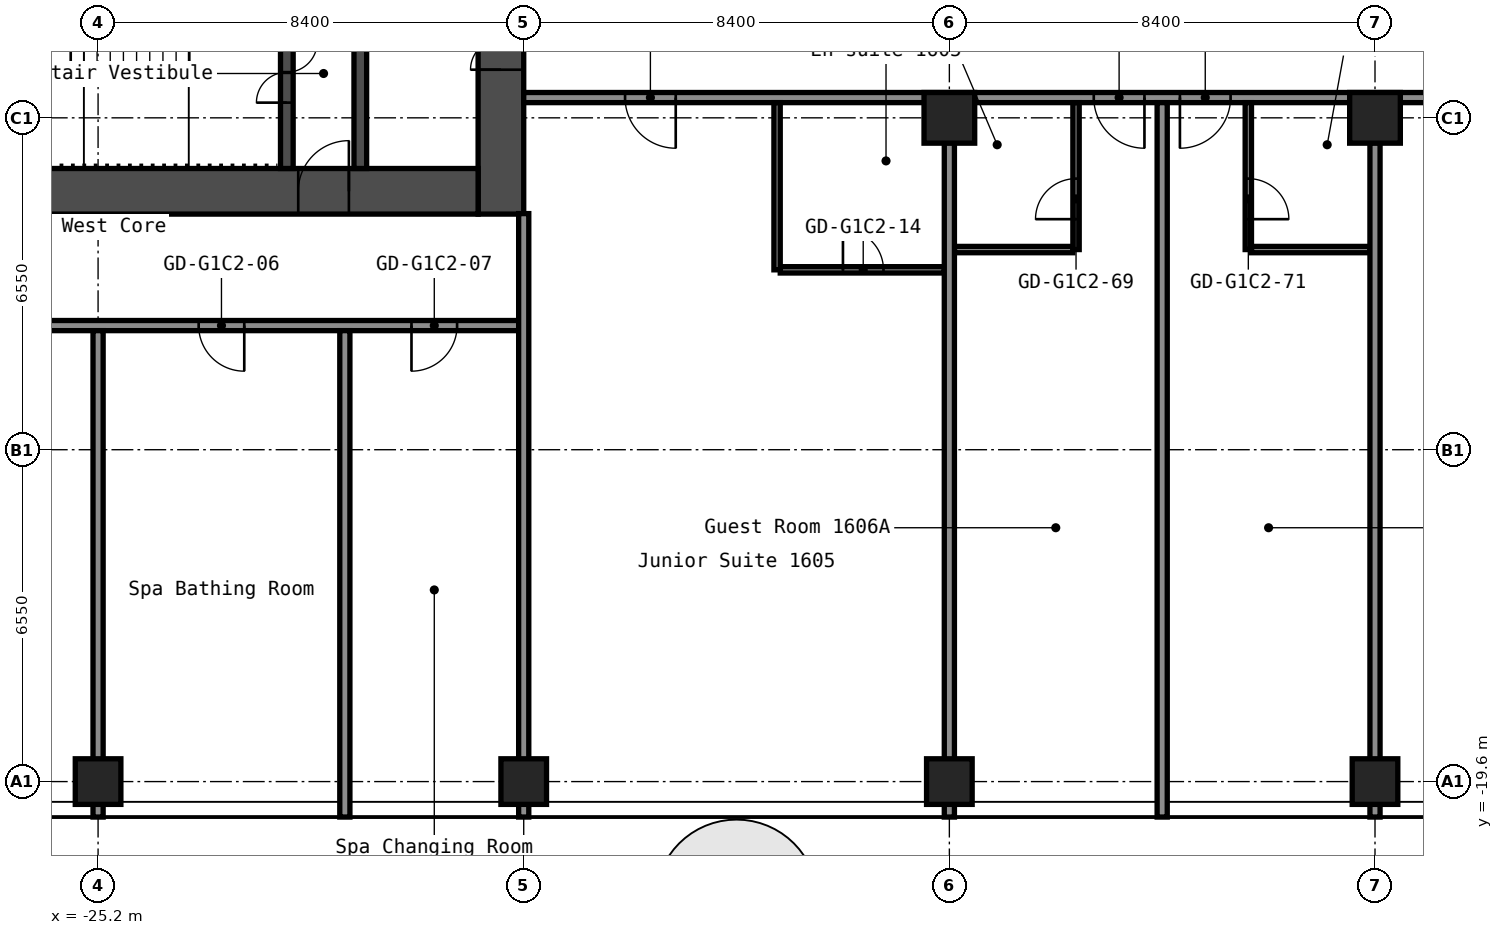
"""IFC4 building model, lengths in metres.
Left out: names, types, materials, properties, quantities, classifications, styles, units other than length and angle.
Written with IfcOpenShell. Run it as: python <this file> out.ifc"""

import sys

from ifc_helpers import new_model, si_unit, direction, frame, frame_2d, origin, origin_2d, place, context, subcontext, project, spatial, rectangle, hollow_rectangle, extrude, element, fill, save


model = new_model("IFC4")
c1 = context("Model", 3, precision=1e-05, world=origin(), true_north=direction((0.0, 1.0)))
c2 = subcontext(c1, "Body", "Model", "MODEL_VIEW")
j1 = project(units=[si_unit("LENGTHUNIT", "METRE"), si_unit("PLANEANGLEUNIT", "RADIAN")], contexts=[c1])
p1 = place(None, origin())
s1 = spatial("IfcSite", under=j1, at=p1, CompositionType="ELEMENT")
p2 = place(p1, origin())
s2 = spatial("IfcBuilding", under=s1, at=p2, CompositionType="ELEMENT")
p3 = place(p2, frame((0.0, 0.0, 58.2)))
s3 = spatial("IfcBuildingStorey", under=s2, at=p3, CompositionType="ELEMENT", Elevation=58.2)
for number, where, z_axis, x_axis in (
    (1, (-25.2, -19.6, 0.0), (0.0, 0.0, 1.0), (1.0, 0.0, 0.0)),
    (2, (-16.8, -19.6, 0.0), (0.0, 0.0, 1.0), (1.0, 0.0, 0.0)),
    (3, (-8.4, -19.6, 0.0), (0.0, 0.0, 1.0), (1.0, 0.0, 0.0)),
):
    element("IfcColumn", number, at=place(p3, frame(where, z_axis=z_axis, x_axis=x_axis)), inside=s3, PredefinedType="COLUMN", context=c2, shape_type="SweptSolid", body=[
        extrude(hollow_rectangle(XDim=0.9, YDim=0.9, WallThickness=0.036, at=origin_2d()), origin(), (0.0, 0.0, 1.0), 2.8),
    ])
p4 = place(p3, frame((-8.4, -6.5, 0.0), z_axis=(0.0, 0.0, 1.0), x_axis=(1.0, 0.0, 0.0)))
e4 = element("IfcColumn", 4, at=p4, inside=s3, PredefinedType="COLUMN", context=c2, shape_type="SweptSolid", body=[
    extrude(hollow_rectangle(XDim=1.0, YDim=1.0, WallThickness=0.04, at=origin_2d()), origin(), (0.0, 0.0, 1.0), 2.8),
])
p5 = place(p3, frame((0.0, -19.6, 0.0), z_axis=(0.0, 0.0, 1.0), x_axis=(1.0, 0.0, 0.0)))
e5 = element("IfcColumn", 5, at=p5, inside=s3, PredefinedType="COLUMN", context=c2, shape_type="SweptSolid", body=[
    extrude(hollow_rectangle(XDim=0.9, YDim=0.9, WallThickness=0.036, at=origin_2d()), origin(), (0.0, 0.0, 1.0), 2.8),
])
p6 = place(p3, frame((0.0, -6.5, 0.0), z_axis=(0.0, 0.0, 1.0), x_axis=(1.0, 0.0, 0.0)))
e6 = element("IfcColumn", 6, at=p6, inside=s3, PredefinedType="COLUMN", context=c2, shape_type="SweptSolid", body=[
    extrude(hollow_rectangle(XDim=1.0, YDim=1.0, WallThickness=0.04, at=origin_2d()), origin(), (0.0, 0.0, 1.0), 2.8),
])
p7 = place(p3, frame((-17.25, -8.4, 0.0), z_axis=(0.0, 0.0, 1.0), x_axis=(0.0, 1.0, 0.0)))
e7 = element("IfcWall", 7, at=p7, inside=s3, PredefinedType="SHEAR", context=c2, shape_type="SweptSolid", body=[
    extrude(rectangle(XDim=16.8, YDim=0.9, at=frame_2d((8.4, 0.0))), origin(), (0.0, 0.0, 1.0), 2.8),
])
p8 = place(p7, frame((12.75, 0.0, 0.0)))
e8 = element("IfcOpeningElement", 8, at=p8, cuts=e7, PredefinedType="OPENING", context=c2, shape_type="SweptSolid", body=[
    extrude(rectangle(XDim=1.2, YDim=2.1, at=frame_2d((0.6, 1.05))), frame((0.0, 0.46, 0.0), z_axis=(0.0, -1.0, 0.0), x_axis=(1.0, 0.0, 0.0)), (0.0, 0.0, 1.0), 0.92),
])
p9 = place(p7, frame((2.85, 0.0, 0.0)))
e9 = element("IfcOpeningElement", 9, at=p9, cuts=e7, PredefinedType="OPENING", context=c2, shape_type="SweptSolid", body=[
    extrude(rectangle(XDim=1.2, YDim=2.1, at=frame_2d((0.6, 1.05))), frame((0.0, 0.46, 0.0), z_axis=(0.0, -1.0, 0.0), x_axis=(1.0, 0.0, 0.0)), (0.0, 0.0, 1.0), 0.92),
])
p10 = place(p3, frame((-32.7, -7.95, 0.0), z_axis=(0.0, 0.0, 1.0), x_axis=(1.0, 0.0, 0.0)))
e10 = element("IfcWall", 10, at=p10, inside=s3, PredefinedType="SHEAR", context=c2, shape_type="SweptSolid", body=[
    extrude(rectangle(XDim=15.0, YDim=0.9, at=frame_2d((7.5, 0.0))), origin(), (0.0, 0.0, 1.0), 2.8),
])
p11 = place(p10, frame((11.45, 0.0, 0.0)))
e11 = element("IfcOpeningElement", 11, at=p11, cuts=e10, PredefinedType="OPENING", context=c2, shape_type="SweptSolid", body=[
    extrude(rectangle(XDim=1.0, YDim=2.1, at=frame_2d((0.5, 1.05))), frame((0.0, 0.46, 0.0), z_axis=(0.0, -1.0, 0.0), x_axis=(1.0, 0.0, 0.0)), (0.0, 0.0, 1.0), 0.92),
])
p12 = place(p3, frame((-20.025, -7.5, 0.0), z_axis=(0.0, 0.0, 1.0), x_axis=(0.0, 1.0, 0.0)))
e12 = element("IfcWall", 12, at=p12, inside=s3, PredefinedType="SHEAR", context=c2, shape_type="SweptSolid", body=[
    extrude(rectangle(XDim=6.3, YDim=0.25, at=frame_2d((3.15, 0.0))), origin(), (0.0, 0.0, 1.0), 2.8),
])
p13 = place(p12, frame((2.4, 0.0, 0.0)))
e13 = element("IfcOpeningElement", 13, at=p13, cuts=e12, PredefinedType="OPENING", context=c2, shape_type="SweptSolid", body=[
    extrude(rectangle(XDim=1.0, YDim=2.1, at=frame_2d((0.5, 1.05))), frame((0.0, 0.135, 0.0), z_axis=(0.0, -1.0, 0.0), x_axis=(1.0, 0.0, 0.0)), (0.0, 0.0, 1.0), 0.27),
])
p14 = place(p3, frame((-21.475, -7.5, 0.0), z_axis=(0.0, 0.0, 1.0), x_axis=(0.0, 1.0, 0.0)))
e14 = element("IfcWall", 14, at=p14, inside=s3, PredefinedType="SHEAR", context=c2, shape_type="SweptSolid", body=[
    extrude(rectangle(XDim=3.75, YDim=0.25, at=frame_2d((1.875, 0.0))), origin(), (0.0, 0.0, 1.0), 2.8),
])
p15 = place(p14, frame((1.3, 0.0, 0.0)))
e15 = element("IfcOpeningElement", 15, at=p15, cuts=e14, PredefinedType="OPENING", context=c2, shape_type="SweptSolid", body=[
    extrude(rectangle(XDim=1.2, YDim=2.1, at=frame_2d((0.6, 1.05))), frame((0.0, 0.135, 0.0), z_axis=(0.0, -1.0, 0.0), x_axis=(1.0, 0.0, 0.0)), (0.0, 0.0, 1.0), 0.27),
])
p16 = place(p3, frame((-51.1, -10.6, 0.0), z_axis=(0.0, 0.0, 1.0), x_axis=(1.0, 0.0, 0.0)))
e16 = element("IfcWall", 16, at=p16, inside=s3, PredefinedType="PARTITIONING", context=c2, shape_type="SweptSolid", body=[
    extrude(rectangle(XDim=34.3, YDim=0.2, at=frame_2d((17.15, 0.0))), origin(), (0.0, 0.0, 1.0), 2.8),
])
p17 = place(p16, frame((2.225, 0.0, 0.0)))
e17 = element("IfcOpeningElement", 17, at=p17, cuts=e16, PredefinedType="OPENING", context=c2, shape_type="SweptSolid", body=[
    extrude(rectangle(XDim=0.9, YDim=2.1, at=frame_2d((0.45, 1.05))), frame((0.0, 0.11, 0.0), z_axis=(0.0, -1.0, 0.0), x_axis=(1.0, 0.0, 0.0)), (0.0, 0.0, 1.0), 0.22),
])
p18 = place(p16, frame((6.625, 0.0, 0.0)))
e18 = element("IfcOpeningElement", 18, at=p18, cuts=e16, PredefinedType="OPENING", context=c2, shape_type="SweptSolid", body=[
    extrude(rectangle(XDim=0.9, YDim=2.1, at=frame_2d((0.45, 1.05))), frame((0.0, 0.11, 0.0), z_axis=(0.0, -1.0, 0.0), x_axis=(1.0, 0.0, 0.0)), (0.0, 0.0, 1.0), 0.22),
])
p19 = place(p16, frame((12.8, 0.0, 0.0)))
e19 = element("IfcOpeningElement", 19, at=p19, cuts=e16, PredefinedType="OPENING", context=c2, shape_type="SweptSolid", body=[
    extrude(rectangle(XDim=1.0, YDim=2.1, at=frame_2d((0.5, 1.05))), frame((0.0, 0.11, 0.0), z_axis=(0.0, -1.0, 0.0), x_axis=(1.0, 0.0, 0.0)), (0.0, 0.0, 1.0), 0.22),
])
p20 = place(p16, frame((21.2, 0.0, 0.0)))
e20 = element("IfcOpeningElement", 20, at=p20, cuts=e16, PredefinedType="OPENING", context=c2, shape_type="SweptSolid", body=[
    extrude(rectangle(XDim=1.0, YDim=2.1, at=frame_2d((0.5, 1.05))), frame((0.0, 0.11, 0.0), z_axis=(0.0, -1.0, 0.0), x_axis=(1.0, 0.0, 0.0)), (0.0, 0.0, 1.0), 0.22),
])
p21 = place(p16, frame((27.885, 0.0, 0.0)))
e21 = element("IfcOpeningElement", 21, at=p21, cuts=e16, PredefinedType="OPENING", context=c2, shape_type="SweptSolid", body=[
    extrude(rectangle(XDim=0.9, YDim=2.1, at=frame_2d((0.45, 1.05))), frame((0.0, 0.11, 0.0), z_axis=(0.0, -1.0, 0.0), x_axis=(1.0, 0.0, 0.0)), (0.0, 0.0, 1.0), 0.22),
])
p22 = place(p16, frame((32.085, 0.0, 0.0)))
e22 = element("IfcOpeningElement", 22, at=p22, cuts=e16, PredefinedType="OPENING", context=c2, shape_type="SweptSolid", body=[
    extrude(rectangle(XDim=0.9, YDim=2.1, at=frame_2d((0.45, 1.05))), frame((0.0, 0.11, 0.0), z_axis=(0.0, -1.0, 0.0), x_axis=(1.0, 0.0, 0.0)), (0.0, 0.0, 1.0), 0.22),
])
p23 = place(p3, frame((-11.738, -9.5, 0.0), z_axis=(0.0, 0.0, 1.0), x_axis=(1.0, 0.0, 0.0)))
e23 = element("IfcWall", 23, at=p23, inside=s3, PredefinedType="PARTITIONING", context=c2, shape_type="SweptSolid", body=[
    extrude(rectangle(XDim=3.238, YDim=0.125, at=frame_2d((1.619, 0.0))), origin(), (0.0, 0.0, 1.0), 2.8),
])
p24 = place(p23, frame((1.238, 0.0, 0.0)))
e24 = element("IfcOpeningElement", 24, at=p24, cuts=e23, PredefinedType="OPENING", context=c2, shape_type="SweptSolid", body=[
    extrude(rectangle(XDim=0.8, YDim=2.1, at=frame_2d((0.4, 1.05))), frame((0.0, 0.073, 0.0), z_axis=(0.0, -1.0, 0.0), x_axis=(1.0, 0.0, 0.0)), (0.0, 0.0, 1.0), 0.145),
])
p25 = place(p3, frame((-8.3, -9.1, 0.0), z_axis=(0.0, 0.0, 1.0), x_axis=(1.0, 0.0, 0.0)))
e25 = element("IfcWall", 25, at=p25, inside=s3, PredefinedType="PARTITIONING", context=c2, shape_type="SweptSolid", body=[
    extrude(rectangle(XDim=2.338, YDim=0.125, at=frame_2d((1.169, 0.0))), origin(), (0.0, 0.0, 1.0), 2.8),
])
p26 = place(p3, frame((-2.438, -9.1, 0.0), z_axis=(0.0, 0.0, 1.0), x_axis=(1.0, 0.0, 0.0)))
e26 = element("IfcWall", 26, at=p26, inside=s3, PredefinedType="PARTITIONING", context=c2, shape_type="SweptSolid", body=[
    extrude(rectangle(XDim=2.337, YDim=0.125, at=frame_2d((1.169, 0.0))), origin(), (0.0, 0.0, 1.0), 2.8),
])
p27 = place(p3, frame((-16.8, -6.1, 0.0), z_axis=(0.0, 0.0, 1.0), x_axis=(1.0, 0.0, 0.0)))
e27 = element("IfcWall", 27, at=p27, inside=s3, PredefinedType="PARTITIONING", context=c2, shape_type="SweptSolid", body=[
    extrude(rectangle(XDim=33.6, YDim=0.2, at=frame_2d((16.8, 0.0))), origin(), (0.0, 0.0, 1.0), 2.8),
])
p28 = place(p27, frame((2.0, 0.0, 0.0)))
e28 = element("IfcOpeningElement", 28, at=p28, cuts=e27, PredefinedType="OPENING", context=c2, shape_type="SweptSolid", body=[
    extrude(rectangle(XDim=1.0, YDim=2.1, at=frame_2d((0.5, 1.05))), frame((0.0, 0.11, 0.0), z_axis=(0.0, -1.0, 0.0), x_axis=(1.0, 0.0, 0.0)), (0.0, 0.0, 1.0), 0.22),
])
p29 = place(p27, frame((11.25, 0.0, 0.0)))
e29 = element("IfcOpeningElement", 29, at=p29, cuts=e27, PredefinedType="OPENING", context=c2, shape_type="SweptSolid", body=[
    extrude(rectangle(XDim=1.0, YDim=2.1, at=frame_2d((0.5, 1.05))), frame((0.0, 0.11, 0.0), z_axis=(0.0, -1.0, 0.0), x_axis=(1.0, 0.0, 0.0)), (0.0, 0.0, 1.0), 0.22),
])
p30 = place(p27, frame((12.95, 0.0, 0.0)))
e30 = element("IfcOpeningElement", 30, at=p30, cuts=e27, PredefinedType="OPENING", context=c2, shape_type="SweptSolid", body=[
    extrude(rectangle(XDim=1.0, YDim=2.1, at=frame_2d((0.5, 1.05))), frame((0.0, 0.11, 0.0), z_axis=(0.0, -1.0, 0.0), x_axis=(1.0, 0.0, 0.0)), (0.0, 0.0, 1.0), 0.22),
])
p31 = place(p27, frame((20.5, 0.0, 0.0)))
e31 = element("IfcOpeningElement", 31, at=p31, cuts=e27, PredefinedType="OPENING", context=c2, shape_type="SweptSolid", body=[
    extrude(rectangle(XDim=1.0, YDim=2.1, at=frame_2d((0.5, 1.05))), frame((0.0, 0.11, 0.0), z_axis=(0.0, -1.0, 0.0), x_axis=(1.0, 0.0, 0.0)), (0.0, 0.0, 1.0), 0.22),
])
p32 = place(p27, frame((28.05, 0.0, 0.0)))
e32 = element("IfcOpeningElement", 32, at=p32, cuts=e27, PredefinedType="OPENING", context=c2, shape_type="SweptSolid", body=[
    extrude(rectangle(XDim=1.0, YDim=2.1, at=frame_2d((0.5, 1.05))), frame((0.0, 0.11, 0.0), z_axis=(0.0, -1.0, 0.0), x_axis=(1.0, 0.0, 0.0)), (0.0, 0.0, 1.0), 0.22),
])
p33 = place(p27, frame((29.75, 0.0, 0.0)))
e33 = element("IfcOpeningElement", 33, at=p33, cuts=e27, PredefinedType="OPENING", context=c2, shape_type="SweptSolid", body=[
    extrude(rectangle(XDim=1.0, YDim=2.1, at=frame_2d((0.5, 1.05))), frame((0.0, 0.11, 0.0), z_axis=(0.0, -1.0, 0.0), x_axis=(1.0, 0.0, 0.0)), (0.0, 0.0, 1.0), 0.22),
])
for number, where, z_axis, x_axis in (
    (34, (-25.2, -20.3, 0.0), (0.0, 0.0, 1.0), (0.0, 1.0, 0.0)),
    (35, (-20.33, -20.3, 0.0), (0.0, 0.0, 1.0), (0.0, 1.0, 0.0)),
):
    element("IfcWall", number, at=place(p3, frame(where, z_axis=z_axis, x_axis=x_axis)), inside=s3, PredefinedType="PARTITIONING", context=c2, shape_type="SweptSolid", body=[
        extrude(rectangle(XDim=9.6, YDim=0.2, at=frame_2d((4.8, 0.0))), origin(), (0.0, 0.0, 1.0), 2.8),
    ])
p34 = place(p3, frame((-16.8, -20.3, 0.0), z_axis=(0.0, 0.0, 1.0), x_axis=(0.0, 1.0, 0.0)))
e36 = element("IfcWall", 36, at=p34, inside=s3, PredefinedType="PARTITIONING", context=c2, shape_type="SweptSolid", body=[
    extrude(rectangle(XDim=11.91, YDim=0.2, at=frame_2d((5.955, 0.0))), origin(), (0.0, 0.0, 1.0), 2.8),
])
p35 = place(p3, frame((-11.8, -9.5, 0.0), z_axis=(0.0, 0.0, 1.0), x_axis=(0.0, 1.0, 0.0)))
e37 = element("IfcWall", 37, at=p35, inside=s3, PredefinedType="PARTITIONING", context=c2, shape_type="SweptSolid", body=[
    extrude(rectangle(XDim=3.3, YDim=0.125, at=frame_2d((1.65, 0.0))), origin(), (0.0, 0.0, 1.0), 2.8),
])
p36 = place(p3, frame((-8.4, -20.3, 0.0), z_axis=(0.0, 0.0, 1.0), x_axis=(0.0, 1.0, 0.0)))
e38 = element("IfcWall", 38, at=p36, inside=s3, PredefinedType="PARTITIONING", context=c2, shape_type="SweptSolid", body=[
    extrude(rectangle(XDim=13.31, YDim=0.2, at=frame_2d((6.655, 0.0))), origin(), (0.0, 0.0, 1.0), 2.8),
])
p37 = place(p3, frame((-5.9, -9.1, 0.0), z_axis=(0.0, 0.0, 1.0), x_axis=(0.0, 1.0, 0.0)))
e39 = element("IfcWall", 39, at=p37, inside=s3, PredefinedType="PARTITIONING", context=c2, shape_type="SweptSolid", body=[
    extrude(rectangle(XDim=2.9, YDim=0.125, at=frame_2d((1.45, 0.0))), origin(), (0.0, 0.0, 1.0), 2.8),
])
p38 = place(p37, frame((0.6, 0.0, 0.0)))
e40 = element("IfcOpeningElement", 40, at=p38, cuts=e39, PredefinedType="OPENING", context=c2, shape_type="SweptSolid", body=[
    extrude(rectangle(XDim=0.8, YDim=2.1, at=frame_2d((0.4, 1.05))), frame((0.0, 0.073, 0.0), z_axis=(0.0, -1.0, 0.0), x_axis=(1.0, 0.0, 0.0)), (0.0, 0.0, 1.0), 0.145),
])
p39 = place(p3, frame((-4.2, -20.3, 0.0), z_axis=(0.0, 0.0, 1.0), x_axis=(0.0, 1.0, 0.0)))
e41 = element("IfcWall", 41, at=p39, inside=s3, PredefinedType="PARTITIONING", context=c2, shape_type="SweptSolid", body=[
    extrude(rectangle(XDim=14.1, YDim=0.2, at=frame_2d((7.05, 0.0))), origin(), (0.0, 0.0, 1.0), 2.8),
])
p40 = place(p3, frame((-2.5, -9.1, 0.0), z_axis=(0.0, 0.0, 1.0), x_axis=(0.0, 1.0, 0.0)))
e42 = element("IfcWall", 42, at=p40, inside=s3, PredefinedType="PARTITIONING", context=c2, shape_type="SweptSolid", body=[
    extrude(rectangle(XDim=2.9, YDim=0.125, at=frame_2d((1.45, 0.0))), origin(), (0.0, 0.0, 1.0), 2.8),
])
p41 = place(p40, frame((0.6, 0.0, 0.0)))
e43 = element("IfcOpeningElement", 43, at=p41, cuts=e42, PredefinedType="OPENING", context=c2, shape_type="SweptSolid", body=[
    extrude(rectangle(XDim=0.8, YDim=2.1, at=frame_2d((0.4, 1.05))), frame((0.0, 0.073, 0.0), z_axis=(0.0, -1.0, 0.0), x_axis=(1.0, 0.0, 0.0)), (0.0, 0.0, 1.0), 0.145),
])
p42 = place(p3, frame((0.0, -20.3, 0.0), z_axis=(0.0, 0.0, 1.0), x_axis=(0.0, 1.0, 0.0)))
e44 = element("IfcWall", 44, at=p42, inside=s3, PredefinedType="PARTITIONING", context=c2, shape_type="SweptSolid", body=[
    extrude(rectangle(XDim=13.31, YDim=0.2, at=frame_2d((6.655, 0.0))), origin(), (0.0, 0.0, 1.0), 2.8),
])
p43 = place(p9, origin())
e45 = element("IfcDoor", 45, at=p43, inside=s3, OperationType="DOUBLE_DOOR_SINGLE_SWING", PredefinedType="DOOR", context=c2, shape_type="SweptSolid", body=[
    extrude(rectangle(XDim=1.2, YDim=2.1, at=frame_2d((0.6, 1.05))), frame((0.0, 0.025, 0.0), z_axis=(0.0, -1.0, 0.0), x_axis=(1.0, 0.0, 0.0)), (0.0, 0.0, 1.0), 0.05),
])
fill(e9, e45)
p44 = place(p11, origin())
e46 = element("IfcDoor", 46, at=p44, inside=s3, OperationType="SINGLE_SWING_LEFT", PredefinedType="DOOR", context=c2, shape_type="SweptSolid", body=[
    extrude(rectangle(XDim=1.0, YDim=2.1, at=frame_2d((0.5, 1.05))), frame((0.0, 0.025, 0.0), z_axis=(0.0, -1.0, 0.0), x_axis=(1.0, 0.0, 0.0)), (0.0, 0.0, 1.0), 0.05),
])
fill(e11, e46)
p45 = place(p15, origin())
e47 = element("IfcDoor", 47, at=p45, inside=s3, OperationType="DOUBLE_DOOR_SINGLE_SWING", PredefinedType="DOOR", context=c2, shape_type="SweptSolid", body=[
    extrude(rectangle(XDim=1.2, YDim=2.1, at=frame_2d((0.6, 1.05))), frame((0.0, 0.025, 0.0), z_axis=(0.0, -1.0, 0.0), x_axis=(1.0, 0.0, 0.0)), (0.0, 0.0, 1.0), 0.05),
])
fill(e15, e47)
p46 = place(p21, origin())
e48 = element("IfcDoor", 48, at=p46, inside=s3, OperationType="SINGLE_SWING_RIGHT", PredefinedType="DOOR", context=c2, shape_type="SweptSolid", body=[
    extrude(rectangle(XDim=0.9, YDim=2.1, at=frame_2d((0.45, 1.05))), frame((0.0, 0.025, 0.0), z_axis=(0.0, -1.0, 0.0), x_axis=(1.0, 0.0, 0.0)), (0.0, 0.0, 1.0), 0.05),
])
fill(e21, e48)
p47 = place(p22, origin())
e49 = element("IfcDoor", 49, at=p47, inside=s3, OperationType="SINGLE_SWING_LEFT", PredefinedType="DOOR", context=c2, shape_type="SweptSolid", body=[
    extrude(rectangle(XDim=0.9, YDim=2.1, at=frame_2d((0.45, 1.05))), frame((0.0, 0.025, 0.0), z_axis=(0.0, -1.0, 0.0), x_axis=(1.0, 0.0, 0.0)), (0.0, 0.0, 1.0), 0.05),
])
fill(e22, e49)
p48 = place(p24, origin())
e50 = element("IfcDoor", 50, at=p48, inside=s3, OperationType="SINGLE_SWING_RIGHT", PredefinedType="DOOR", context=c2, shape_type="SweptSolid", body=[
    extrude(rectangle(XDim=0.8, YDim=2.1, at=frame_2d((0.4, 1.05))), frame((0.0, 0.025, 0.0), z_axis=(0.0, -1.0, 0.0), x_axis=(1.0, 0.0, 0.0)), (0.0, 0.0, 1.0), 0.05),
])
fill(e24, e50)
p49 = place(p28, origin())
e51 = element("IfcDoor", 51, at=p49, inside=s3, OperationType="SINGLE_SWING_RIGHT", PredefinedType="DOOR", context=c2, shape_type="SweptSolid", body=[
    extrude(rectangle(XDim=1.0, YDim=2.1, at=frame_2d((0.5, 1.05))), frame((0.0, 0.025, 0.0), z_axis=(0.0, -1.0, 0.0), x_axis=(1.0, 0.0, 0.0)), (0.0, 0.0, 1.0), 0.05),
])
fill(e28, e51)
p50 = place(p29, origin())
e52 = element("IfcDoor", 52, at=p50, inside=s3, OperationType="SINGLE_SWING_RIGHT", PredefinedType="DOOR", context=c2, shape_type="SweptSolid", body=[
    extrude(rectangle(XDim=1.0, YDim=2.1, at=frame_2d((0.5, 1.05))), frame((0.0, 0.025, 0.0), z_axis=(0.0, -1.0, 0.0), x_axis=(1.0, 0.0, 0.0)), (0.0, 0.0, 1.0), 0.05),
])
fill(e29, e52)
p51 = place(p30, origin())
e53 = element("IfcDoor", 53, at=p51, inside=s3, OperationType="SINGLE_SWING_LEFT", PredefinedType="DOOR", context=c2, shape_type="SweptSolid", body=[
    extrude(rectangle(XDim=1.0, YDim=2.1, at=frame_2d((0.5, 1.05))), frame((0.0, 0.025, 0.0), z_axis=(0.0, -1.0, 0.0), x_axis=(1.0, 0.0, 0.0)), (0.0, 0.0, 1.0), 0.05),
])
fill(e30, e53)
p52 = place(p38, origin())
e54 = element("IfcDoor", 54, at=p52, inside=s3, OperationType="SINGLE_SWING_RIGHT", PredefinedType="DOOR", context=c2, shape_type="SweptSolid", body=[
    extrude(rectangle(XDim=0.8, YDim=2.1, at=frame_2d((0.4, 1.05))), frame((0.0, 0.025, 0.0), z_axis=(0.0, -1.0, 0.0), x_axis=(1.0, 0.0, 0.0)), (0.0, 0.0, 1.0), 0.05),
])
fill(e40, e54)
p53 = place(p41, origin())
e55 = element("IfcDoor", 55, at=p53, inside=s3, OperationType="SINGLE_SWING_LEFT", PredefinedType="DOOR", context=c2, shape_type="SweptSolid", body=[
    extrude(rectangle(XDim=0.8, YDim=2.1, at=frame_2d((0.4, 1.05))), frame((0.0, 0.025, 0.0), z_axis=(0.0, -1.0, 0.0), x_axis=(1.0, 0.0, 0.0)), (0.0, 0.0, 1.0), 0.05),
])
fill(e43, e55)
save(model, sys.argv[1])
